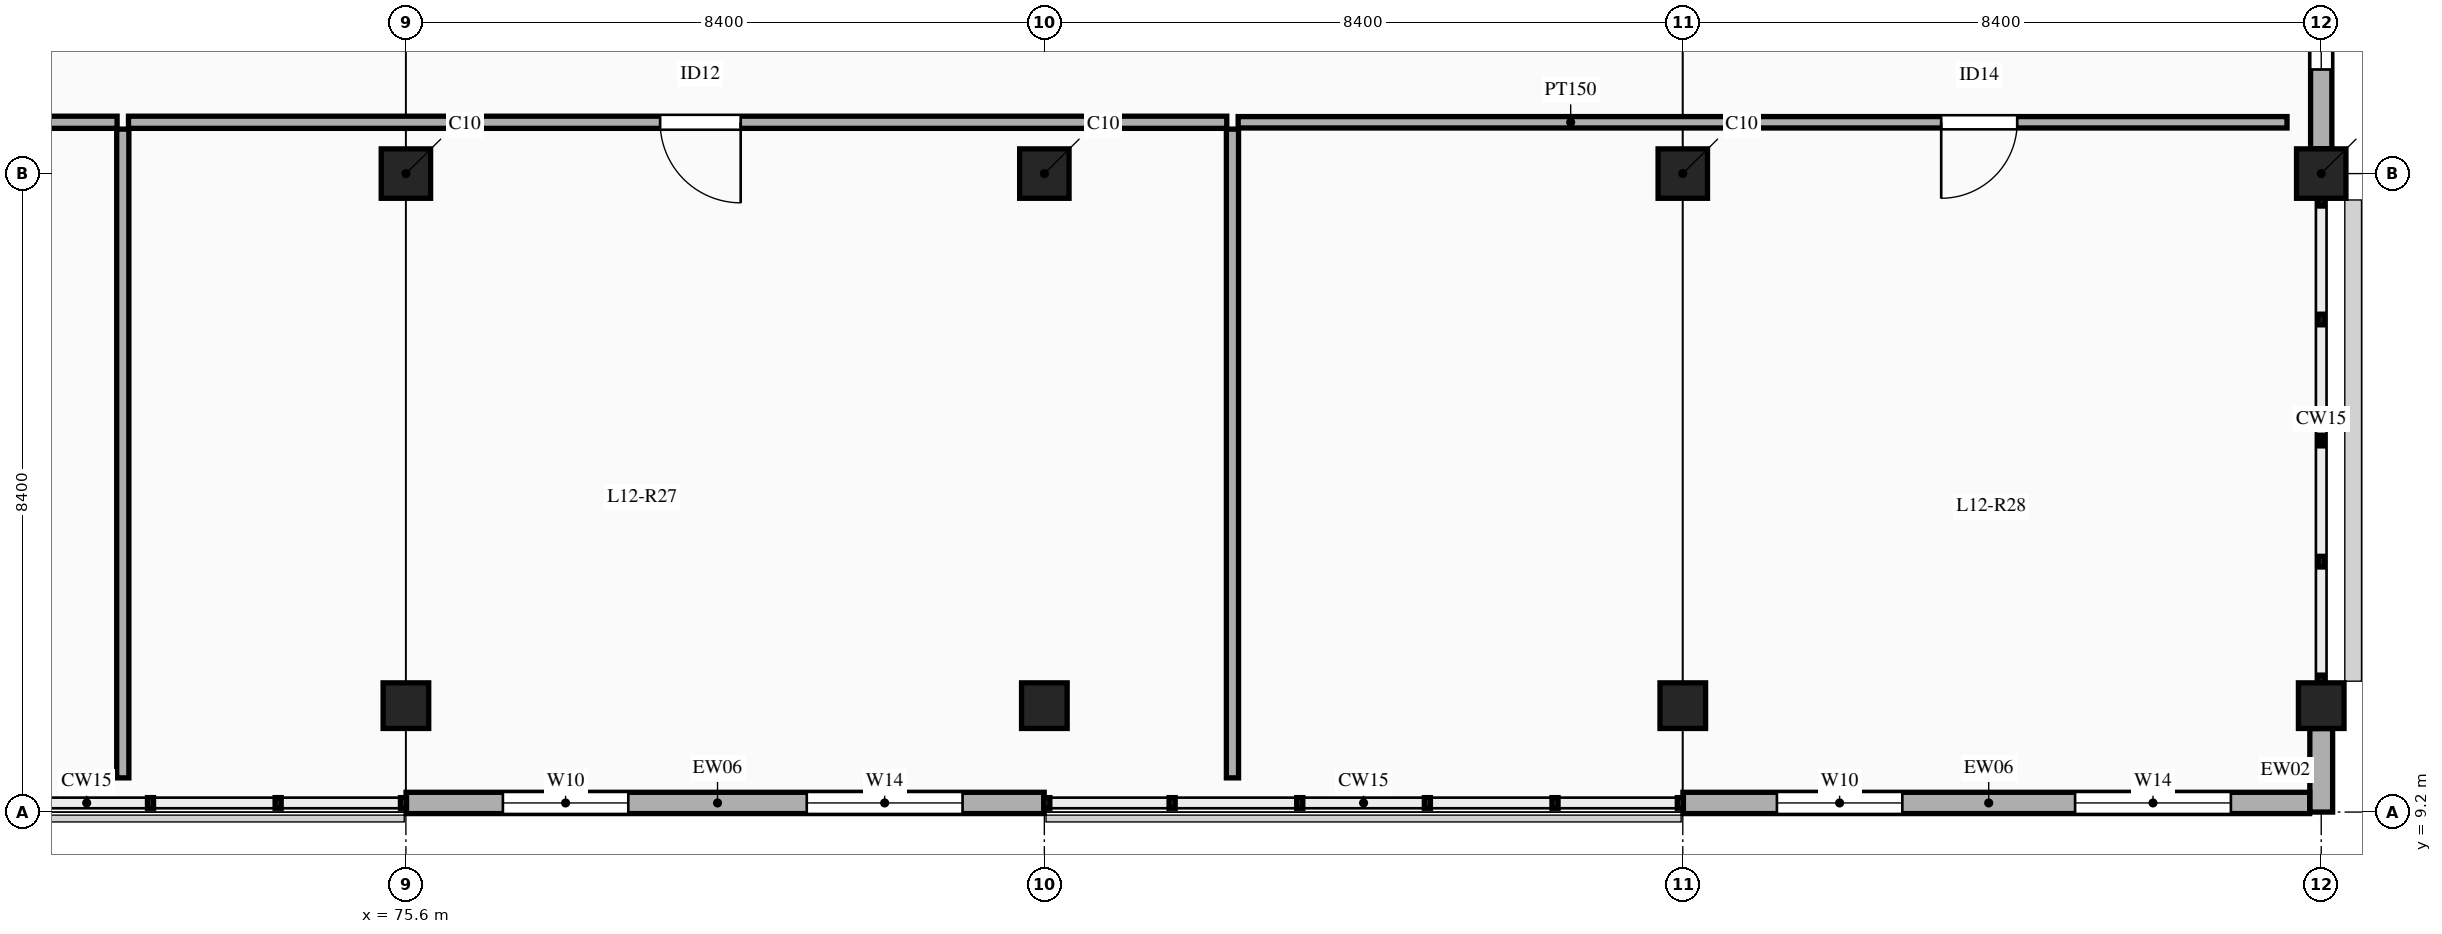
"""IFC4 building model, lengths in metres.
Left out: names, types, materials, properties, quantities, classifications, styles, units other than length and angle.
Written with IfcOpenShell. Run it as: python <this file> out.ifc"""

import sys

from ifc_helpers import new_model, si_unit, direction, frame, frame_2d, origin, origin_2d, place, context, subcontext, project, spatial, rectangle, extrude, element, fill, save


model = new_model("IFC4")
c1 = context("Model", 3, precision=1e-05, world=origin(), true_north=direction((0.0, 1.0)))
c2 = subcontext(c1, "Body", "Model", "MODEL_VIEW")
j1 = project(units=[si_unit("LENGTHUNIT", "METRE"), si_unit("PLANEANGLEUNIT", "RADIAN")], contexts=[c1])
p1 = place(None, origin())
s1 = spatial("IfcSite", under=j1, at=p1, CompositionType="ELEMENT")
p2 = place(p1, origin())
s2 = spatial("IfcBuilding", under=s1, at=p2, CompositionType="ELEMENT")
p3 = place(p2, frame((0.0, 0.0, 55.5)))
s3 = spatial("IfcBuildingStorey", under=s2, at=p3, CompositionType="ELEMENT", Elevation=55.5)
p4 = place(p3, frame((75.6, 10.6, 0.0), z_axis=(0.0, 0.0, 1.0), x_axis=(1.0, 0.0, 0.0)))
e1 = element("IfcColumn", 1, at=p4, inside=s3, PredefinedType="COLUMN", context=c2, shape_type="SweptSolid", body=[
    extrude(rectangle(XDim=0.6, YDim=0.6, at=origin_2d()), origin(), (0.0, 0.0, 1.0), 4.5),
])
p5 = place(p3, frame((75.6, 17.6, 0.0), z_axis=(0.0, 0.0, 1.0), x_axis=(1.0, 0.0, 0.0)))
e2 = element("IfcColumn", 2, at=p5, inside=s3, PredefinedType="COLUMN", context=c2, shape_type="SweptSolid", body=[
    extrude(rectangle(XDim=0.65, YDim=0.65, at=origin_2d()), origin(), (0.0, 0.0, 1.0), 4.5),
])
p6 = place(p3, frame((84.0, 10.6, 0.0), z_axis=(0.0, 0.0, 1.0), x_axis=(1.0, 0.0, 0.0)))
e3 = element("IfcColumn", 3, at=p6, inside=s3, PredefinedType="COLUMN", context=c2, shape_type="SweptSolid", body=[
    extrude(rectangle(XDim=0.6, YDim=0.6, at=origin_2d()), origin(), (0.0, 0.0, 1.0), 4.5),
])
p7 = place(p3, frame((84.0, 17.6, 0.0), z_axis=(0.0, 0.0, 1.0), x_axis=(1.0, 0.0, 0.0)))
e4 = element("IfcColumn", 4, at=p7, inside=s3, PredefinedType="COLUMN", context=c2, shape_type="SweptSolid", body=[
    extrude(rectangle(XDim=0.65, YDim=0.65, at=origin_2d()), origin(), (0.0, 0.0, 1.0), 4.5),
])
p8 = place(p3, frame((92.4, 10.6, 0.0), z_axis=(0.0, 0.0, 1.0), x_axis=(1.0, 0.0, 0.0)))
e5 = element("IfcColumn", 5, at=p8, inside=s3, PredefinedType="COLUMN", context=c2, shape_type="SweptSolid", body=[
    extrude(rectangle(XDim=0.6, YDim=0.6, at=origin_2d()), origin(), (0.0, 0.0, 1.0), 4.5),
])
p9 = place(p3, frame((92.4, 17.6, 0.0), z_axis=(0.0, 0.0, 1.0), x_axis=(1.0, 0.0, 0.0)))
e6 = element("IfcColumn", 6, at=p9, inside=s3, PredefinedType="COLUMN", context=c2, shape_type="SweptSolid", body=[
    extrude(rectangle(XDim=0.65, YDim=0.65, at=origin_2d()), origin(), (0.0, 0.0, 1.0), 4.5),
])
p10 = place(p3, frame((100.8, 10.6, 0.0), z_axis=(0.0, 0.0, 1.0), x_axis=(1.0, 0.0, 0.0)))
e7 = element("IfcColumn", 7, at=p10, inside=s3, PredefinedType="COLUMN", context=c2, shape_type="SweptSolid", body=[
    extrude(rectangle(XDim=0.6, YDim=0.6, at=origin_2d()), origin(), (0.0, 0.0, 1.0), 4.5),
])
p11 = place(p3, frame((100.8, 17.6, 0.0), z_axis=(0.0, 0.0, 1.0), x_axis=(1.0, 0.0, 0.0)))
e8 = element("IfcColumn", 8, at=p11, inside=s3, PredefinedType="COLUMN", context=c2, shape_type="SweptSolid", body=[
    extrude(rectangle(XDim=0.65, YDim=0.65, at=origin_2d()), origin(), (0.0, 0.0, 1.0), 4.5),
])
p12 = place(p3, frame((100.8, 9.2, 0.0), z_axis=(0.0, 0.0, 1.0), x_axis=(0.0, 1.0, 0.0)))
e9 = element("IfcWall", 9, at=p12, inside=s3, PredefinedType="SOLIDWALL", context=c2, shape_type="SweptSolid", body=[
    extrude(rectangle(XDim=1.098, YDim=0.3, at=frame_2d((0.549, 0.0))), origin(), (0.0, 0.0, 1.0), 3.55),
])
p13 = place(p3, frame((75.602, 9.32, 0.0), z_axis=(0.0, 0.0, 1.0), x_axis=(1.0, 0.0, 0.0)))
e10 = element("IfcWall", 10, at=p13, inside=s3, PredefinedType="ELEMENTEDWALL", context=c2, shape_type="SweptSolid", body=[
    extrude(rectangle(XDim=8.396, YDim=0.28, at=frame_2d((4.198, 0.0))), origin(), (0.0, 0.0, 1.0), 3.55),
])
p14 = place(p13, frame((1.274, 0.0, 0.9)))
e11 = element("IfcOpeningElement", 11, at=p14, cuts=e10, PredefinedType="OPENING", context=c2, shape_type="SweptSolid", body=[
    extrude(rectangle(XDim=1.65, YDim=1.95, at=frame_2d((0.825, 0.975))), frame((0.0, 0.15, 0.0), z_axis=(0.0, -1.0, 0.0), x_axis=(1.0, 0.0, 0.0)), (0.0, 0.0, 1.0), 0.3),
])
p15 = place(p13, frame((5.272, 0.0, 0.9)))
e12 = element("IfcOpeningElement", 12, at=p15, cuts=e10, PredefinedType="OPENING", context=c2, shape_type="SweptSolid", body=[
    extrude(rectangle(XDim=2.05, YDim=2.1, at=frame_2d((1.025, 1.05))), frame((0.0, 0.15, 0.0), z_axis=(0.0, -1.0, 0.0), x_axis=(1.0, 0.0, 0.0)), (0.0, 0.0, 1.0), 0.3),
])
p16 = place(p3, frame((92.402, 9.32, 0.0), z_axis=(0.0, 0.0, 1.0), x_axis=(1.0, 0.0, 0.0)))
e13 = element("IfcWall", 13, at=p16, inside=s3, PredefinedType="ELEMENTEDWALL", context=c2, shape_type="SweptSolid", body=[
    extrude(rectangle(XDim=8.246, YDim=0.28, at=frame_2d((4.123, 0.0))), origin(), (0.0, 0.0, 1.0), 3.55),
])
p17 = place(p16, frame((1.237, 0.0, 0.9)))
e14 = element("IfcOpeningElement", 14, at=p17, cuts=e13, PredefinedType="OPENING", context=c2, shape_type="SweptSolid", body=[
    extrude(rectangle(XDim=1.65, YDim=1.95, at=frame_2d((0.825, 0.975))), frame((0.0, 0.15, 0.0), z_axis=(0.0, -1.0, 0.0), x_axis=(1.0, 0.0, 0.0)), (0.0, 0.0, 1.0), 0.3),
])
p18 = place(p16, frame((5.159, 0.0, 0.9)))
e15 = element("IfcOpeningElement", 15, at=p18, cuts=e13, PredefinedType="OPENING", context=c2, shape_type="SweptSolid", body=[
    extrude(rectangle(XDim=2.05, YDim=2.1, at=frame_2d((1.025, 1.05))), frame((0.0, 0.15, 0.0), z_axis=(0.0, -1.0, 0.0), x_axis=(1.0, 0.0, 0.0)), (0.0, 0.0, 1.0), 0.3),
])
p19 = place(p3, frame((100.8, 17.927, 0.0), z_axis=(0.0, 0.0, 1.0), x_axis=(0.0, 1.0, 0.0)))
e16 = element("IfcWall", 16, at=p19, inside=s3, PredefinedType="ELEMENTEDWALL", context=c2, shape_type="SweptSolid", body=[
    extrude(rectangle(XDim=7.871, YDim=0.28, at=frame_2d((3.936, 0.0))), origin(), (0.0, 0.0, 1.0), 3.55),
])
p20 = place(p19, frame((1.043, 0.0, 0.9)))
e17 = element("IfcOpeningElement", 17, at=p20, cuts=e16, PredefinedType="OPENING", context=c2, shape_type="SweptSolid", body=[
    extrude(rectangle(XDim=1.85, YDim=2.05, at=frame_2d((0.925, 1.025))), frame((0.0, 0.15, 0.0), z_axis=(0.0, -1.0, 0.0), x_axis=(1.0, 0.0, 0.0)), (0.0, 0.0, 1.0), 0.3),
])
p21 = place(p3, frame((59.25, 18.275, 0.0), z_axis=(0.0, 0.0, 1.0), x_axis=(1.0, 0.0, 0.0)))
e18 = element("IfcWall", 18, at=p21, inside=s3, PredefinedType="PARTITIONING", context=c2, shape_type="SweptSolid", body=[
    extrude(rectangle(XDim=12.55, YDim=0.16, at=frame_2d((6.275, 0.0))), origin(), (0.0, 0.0, 1.0), 3.45),
])
p22 = place(p21, frame((3.562, 0.0, 0.0)))
e19 = element("IfcOpeningElement", 19, at=p22, cuts=e18, PredefinedType="OPENING", context=c2, shape_type="SweptSolid", body=[
    extrude(rectangle(XDim=1.06, YDim=2.18, at=frame_2d((0.53, 1.09))), frame((0.0, 0.09, 0.0), z_axis=(0.0, -1.0, 0.0), x_axis=(1.0, 0.0, 0.0)), (0.0, 0.0, 1.0), 0.18),
])
p23 = place(p3, frame((71.95, 18.275, 0.0), z_axis=(0.0, 0.0, 1.0), x_axis=(1.0, 0.0, 0.0)))
e20 = element("IfcWall", 20, at=p23, inside=s3, PredefinedType="PARTITIONING", context=c2, shape_type="SweptSolid", body=[
    extrude(rectangle(XDim=14.45, YDim=0.16, at=frame_2d((7.225, 0.0))), origin(), (0.0, 0.0, 1.0), 3.45),
])
p24 = place(p23, frame((6.995, 0.0, 0.0)))
e21 = element("IfcOpeningElement", 21, at=p24, cuts=e20, PredefinedType="OPENING", context=c2, shape_type="SweptSolid", body=[
    extrude(rectangle(XDim=1.06, YDim=2.18, at=frame_2d((0.53, 1.09))), frame((0.0, 0.09, 0.0), z_axis=(0.0, -1.0, 0.0), x_axis=(1.0, 0.0, 0.0)), (0.0, 0.0, 1.0), 0.18),
])
p25 = place(p3, frame((86.55, 18.275, 0.0), z_axis=(0.0, 0.0, 1.0), x_axis=(1.0, 0.0, 0.0)))
e22 = element("IfcWall", 22, at=p25, inside=s3, PredefinedType="PARTITIONING", context=c2, shape_type="SweptSolid", body=[
    extrude(rectangle(XDim=13.8, YDim=0.15, at=frame_2d((6.9, 0.0))), origin(), (0.0, 0.0, 1.0), 3.45),
])
p26 = place(p25, frame((9.25, 0.0, 0.0)))
e23 = element("IfcOpeningElement", 23, at=p26, cuts=e22, PredefinedType="OPENING", context=c2, shape_type="SweptSolid", body=[
    extrude(rectangle(XDim=1.0, YDim=2.15, at=frame_2d((0.5, 1.075))), frame((0.0, 0.085, 0.0), z_axis=(0.0, -1.0, 0.0), x_axis=(1.0, 0.0, 0.0)), (0.0, 0.0, 1.0), 0.17),
])
for number, where, z_axis, x_axis in (
    (24, (71.875, 9.65, 0.0), (0.0, 0.0, 1.0), (0.0, 1.0, 0.0)),
    (25, (86.475, 9.65, 0.0), (0.0, 0.0, 1.0), (0.0, 1.0, 0.0)),
):
    element("IfcWall", number, at=place(p3, frame(where, z_axis=z_axis, x_axis=x_axis)), inside=s3, PredefinedType="PARTITIONING", context=c2, shape_type="SweptSolid", body=[
        extrude(rectangle(XDim=8.535, YDim=0.16, at=frame_2d((4.268, 0.0))), origin(), (0.0, 0.0, 1.0), 3.45),
    ])
p27 = place(p14, origin())
e26 = element("IfcWindow", 26, at=p27, inside=s3, PartitioningType="DOUBLE_PANEL_HORIZONTAL", PredefinedType="WINDOW", context=c2, shape_type="SweptSolid", body=[
    extrude(rectangle(XDim=1.65, YDim=1.95, at=frame_2d((0.825, 0.975))), frame((0.0, 0.03, 0.0), z_axis=(0.0, -1.0, 0.0), x_axis=(1.0, 0.0, 0.0)), (0.0, 0.0, 1.0), 0.06),
])
fill(e11, e26)
p28 = place(p15, origin())
e27 = element("IfcWindow", 27, at=p28, inside=s3, PartitioningType="TRIPLE_PANEL_VERTICAL", PredefinedType="WINDOW", context=c2, shape_type="SweptSolid", body=[
    extrude(rectangle(XDim=2.05, YDim=2.1, at=frame_2d((1.025, 1.05))), frame((0.0, 0.03, 0.0), z_axis=(0.0, -1.0, 0.0), x_axis=(1.0, 0.0, 0.0)), (0.0, 0.0, 1.0), 0.06),
])
fill(e12, e27)
p29 = place(p17, origin())
e28 = element("IfcWindow", 28, at=p29, inside=s3, PartitioningType="DOUBLE_PANEL_HORIZONTAL", PredefinedType="WINDOW", context=c2, shape_type="SweptSolid", body=[
    extrude(rectangle(XDim=1.65, YDim=1.95, at=frame_2d((0.825, 0.975))), frame((0.0, 0.03, 0.0), z_axis=(0.0, -1.0, 0.0), x_axis=(1.0, 0.0, 0.0)), (0.0, 0.0, 1.0), 0.06),
])
fill(e14, e28)
p30 = place(p18, origin())
e29 = element("IfcWindow", 29, at=p30, inside=s3, PartitioningType="TRIPLE_PANEL_VERTICAL", PredefinedType="WINDOW", context=c2, shape_type="SweptSolid", body=[
    extrude(rectangle(XDim=2.05, YDim=2.1, at=frame_2d((1.025, 1.05))), frame((0.0, 0.03, 0.0), z_axis=(0.0, -1.0, 0.0), x_axis=(1.0, 0.0, 0.0)), (0.0, 0.0, 1.0), 0.06),
])
fill(e15, e29)
p31 = place(p20, origin())
e30 = element("IfcWindow", 30, at=p31, inside=s3, PartitioningType="DOUBLE_PANEL_HORIZONTAL", PredefinedType="WINDOW", context=c2, shape_type="SweptSolid", body=[
    extrude(rectangle(XDim=1.85, YDim=2.05, at=frame_2d((0.925, 1.025))), frame((0.0, 0.03, 0.0), z_axis=(0.0, -1.0, 0.0), x_axis=(1.0, 0.0, 0.0)), (0.0, 0.0, 1.0), 0.06),
])
fill(e17, e30)
p32 = place(p24, frame((1.06, 0.0, 0.0), z_axis=(0.0, 0.0, 1.0), x_axis=(-1.0, 0.0, 0.0)))
e31 = element("IfcDoor", 31, at=p32, inside=s3, OperationType="SINGLE_SWING_LEFT", PredefinedType="DOOR", context=c2, shape_type="SweptSolid", body=[
    extrude(rectangle(XDim=1.06, YDim=2.18, at=frame_2d((0.53, 1.09))), frame((0.0, 0.025, 0.0), z_axis=(0.0, -1.0, 0.0), x_axis=(1.0, 0.0, 0.0)), (0.0, 0.0, 1.0), 0.05),
])
fill(e21, e31)
p33 = place(p26, frame((1.0, 0.0, 0.0), z_axis=(0.0, 0.0, 1.0), x_axis=(-1.0, 0.0, 0.0)))
e32 = element("IfcDoor", 32, at=p33, inside=s3, OperationType="SINGLE_SWING_RIGHT", PredefinedType="DOOR", context=c2, shape_type="SweptSolid", body=[
    extrude(rectangle(XDim=1.0, YDim=2.15, at=frame_2d((0.5, 1.075))), frame((0.0, 0.025, 0.0), z_axis=(0.0, -1.0, 0.0), x_axis=(1.0, 0.0, 0.0)), (0.0, 0.0, 1.0), 0.05),
])
fill(e23, e32)
save(model, sys.argv[1])
